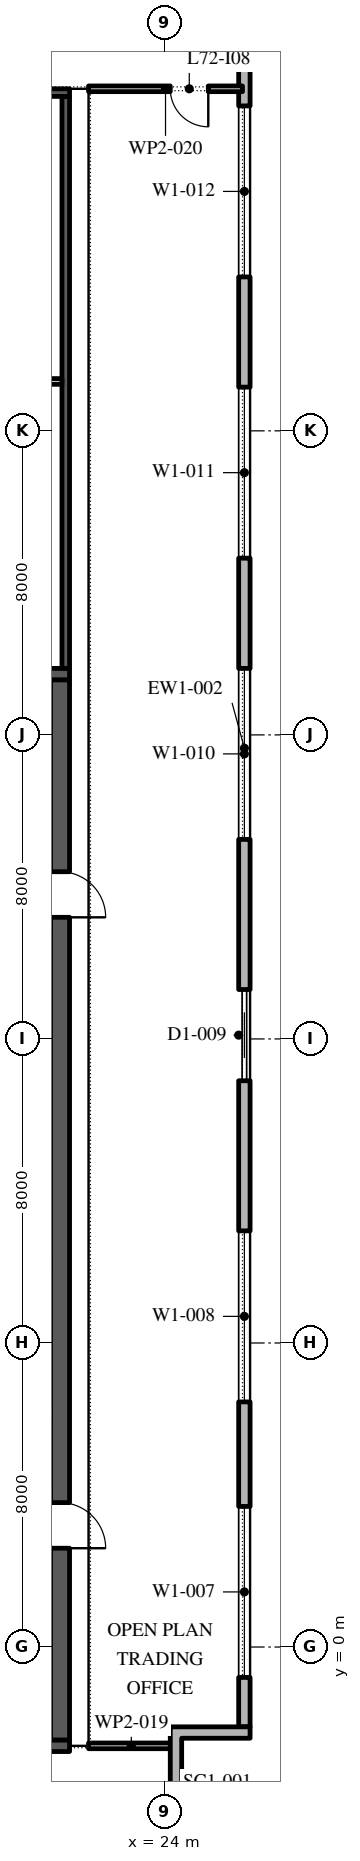
"""IFC4 building model, lengths in metres.
Left out: names, types, materials, properties, quantities, classifications, styles, units other than length and angle.
Written with IfcOpenShell. Run it as: python <this file> out.ifc"""

import sys

from ifc_helpers import new_model, si_unit, direction, frame, frame_2d, origin, place, context, subcontext, project, spatial, polyline, rectangle, outline, extrude, element, fill, save


model = new_model("IFC4")
c1 = context("Model", 3, precision=1e-05, world=origin(), true_north=direction((0.0, 1.0)))
c2 = subcontext(c1, "Body", "Model", "MODEL_VIEW")
j1 = project(units=[si_unit("LENGTHUNIT", "METRE"), si_unit("PLANEANGLEUNIT", "RADIAN")], contexts=[c1])
p1 = place(None, origin())
s1 = spatial("IfcSite", under=j1, at=p1, CompositionType="ELEMENT")
p2 = place(p1, origin())
s2 = spatial("IfcBuilding", under=s1, at=p2, CompositionType="ELEMENT")
p3 = place(p2, frame((0.0, 0.0, 330.0)))
s3 = spatial("IfcBuildingStorey", under=s2, at=p3, CompositionType="ELEMENT", Elevation=330.0)
p4 = place(p3, frame((26.1, -2.1, 0.0), z_axis=(0.0, 0.0, 1.0), x_axis=(0.0, 1.0, 0.0)))
e1 = element("IfcWall", 1, at=p4, inside=s3, PredefinedType="STANDARD", context=c2, shape_type="SweptSolid", body=[
    extrude(rectangle(XDim=51.5, YDim=0.3, at=frame_2d((25.75, 0.0))), origin(), (0.0, 0.0, 1.0), 4.0),
])
p5 = place(p4, frame((1.3, 0.0, 0.45)))
e2 = element("IfcOpeningElement", 2, at=p5, cuts=e1, PredefinedType="OPENING", context=c2, shape_type="SweptSolid", body=[
    extrude(rectangle(XDim=4.5, YDim=3.05, at=frame_2d((2.25, 1.525))), frame((0.0, 0.16, 0.0), z_axis=(0.0, -1.0, 0.0), x_axis=(1.0, 0.0, 0.0)), (0.0, 0.0, 1.0), 0.32),
])
p6 = place(p4, frame((8.55, 0.0, 0.45)))
e3 = element("IfcOpeningElement", 3, at=p6, cuts=e1, PredefinedType="OPENING", context=c2, shape_type="SweptSolid", body=[
    extrude(rectangle(XDim=4.5, YDim=3.05, at=frame_2d((2.25, 1.525))), frame((0.0, 0.16, 0.0), z_axis=(0.0, -1.0, 0.0), x_axis=(1.0, 0.0, 0.0)), (0.0, 0.0, 1.0), 0.32),
])
p7 = place(p4, frame((17.0, 0.0, 0.0)))
e4 = element("IfcOpeningElement", 4, at=p7, cuts=e1, PredefinedType="OPENING", context=c2, shape_type="SweptSolid", body=[
    extrude(rectangle(XDim=2.4, YDim=3.5, at=frame_2d((1.2, 1.75))), frame((0.0, 0.16, 0.0), z_axis=(0.0, -1.0, 0.0), x_axis=(1.0, 0.0, 0.0)), (0.0, 0.0, 1.0), 0.32),
])
p8 = place(p4, frame((23.35, 0.0, 0.45)))
e5 = element("IfcOpeningElement", 5, at=p8, cuts=e1, PredefinedType="OPENING", context=c2, shape_type="SweptSolid", body=[
    extrude(rectangle(XDim=4.5, YDim=3.05, at=frame_2d((2.25, 1.525))), frame((0.0, 0.16, 0.0), z_axis=(0.0, -1.0, 0.0), x_axis=(1.0, 0.0, 0.0)), (0.0, 0.0, 1.0), 0.32),
])
p9 = place(p4, frame((30.75, 0.0, 0.45)))
e6 = element("IfcOpeningElement", 6, at=p9, cuts=e1, PredefinedType="OPENING", context=c2, shape_type="SweptSolid", body=[
    extrude(rectangle(XDim=4.5, YDim=3.05, at=frame_2d((2.25, 1.525))), frame((0.0, 0.16, 0.0), z_axis=(0.0, -1.0, 0.0), x_axis=(1.0, 0.0, 0.0)), (0.0, 0.0, 1.0), 0.32),
])
p10 = place(p4, frame((38.15, 0.0, 0.45)))
e7 = element("IfcOpeningElement", 7, at=p10, cuts=e1, PredefinedType="OPENING", context=c2, shape_type="SweptSolid", body=[
    extrude(rectangle(XDim=4.5, YDim=3.05, at=frame_2d((2.25, 1.525))), frame((0.0, 0.16, 0.0), z_axis=(0.0, -1.0, 0.0), x_axis=(1.0, 0.0, 0.0)), (0.0, 0.0, 1.0), 0.32),
])
p11 = place(p4, frame((46.6, 0.0, 0.0)))
e8 = element("IfcOpeningElement", 8, at=p11, cuts=e1, PredefinedType="OPENING", context=c2, shape_type="SweptSolid", body=[
    extrude(rectangle(XDim=2.4, YDim=3.5, at=frame_2d((1.2, 1.75))), frame((0.0, 0.16, 0.0), z_axis=(0.0, -1.0, 0.0), x_axis=(1.0, 0.0, 0.0)), (0.0, 0.0, 1.0), 0.32),
])
p12 = place(p3, origin())
e9 = element("IfcWall", 9, at=p12, inside=s3, PredefinedType="STANDARD", context=c2, shape_type="SweptSolid", body=[
    extrude(outline(polyline([(24.15, -3.9), (24.15, -2.1), (26.25, -2.1), (26.25, -2.4), (24.45, -2.4), (24.45, -4.2), (22.65, -4.2), (22.65, -5.7), (22.35, -5.7), (22.35, -3.9), (24.15, -3.9)])), origin(), (0.0, 0.0, 1.0), 4.0),
])
p13 = place(p3, frame((21.25, -2.45, 0.0), z_axis=(0.0, 0.0, 1.0), x_axis=(0.0, 1.0, 0.0)))
e10 = element("IfcWall", 10, at=p13, inside=s3, PredefinedType="SHEAR", context=c2, shape_type="SweptSolid", body=[
    extrude(rectangle(XDim=27.9, YDim=0.5, at=frame_2d((13.95, 0.0))), origin(), (0.0, 0.0, 1.0), 4.0),
])
p14 = place(p13, frame((5.05, 0.0, 0.0)))
e11 = element("IfcOpeningElement", 11, at=p14, cuts=e10, PredefinedType="OPENING", context=c2, shape_type="SweptSolid", body=[
    extrude(rectangle(XDim=1.2, YDim=2.1, at=frame_2d((0.6, 1.05))), frame((0.0, 0.26, 0.0), z_axis=(0.0, -1.0, 0.0), x_axis=(1.0, 0.0, 0.0)), (0.0, 0.0, 1.0), 0.52),
])
p15 = place(p13, frame((21.65, 0.0, 0.0)))
e12 = element("IfcOpeningElement", 12, at=p15, cuts=e10, PredefinedType="OPENING", context=c2, shape_type="SweptSolid", body=[
    extrude(rectangle(XDim=1.2, YDim=2.1, at=frame_2d((0.6, 1.05))), frame((0.0, 0.26, 0.0), z_axis=(0.0, -1.0, 0.0), x_axis=(1.0, 0.0, 0.0)), (0.0, 0.0, 1.0), 0.52),
])
for number, where, z_axis, x_axis in (
    (13, (10.5, -2.6, 0.0), (0.0, 0.0, 1.0), (1.0, 0.0, 0.0)),
    (14, (10.5, 25.6, 0.0), (0.0, 0.0, 1.0), (1.0, 0.0, 0.0)),
):
    element("IfcWall", number, at=place(p3, frame(where, z_axis=z_axis, x_axis=x_axis)), inside=s3, PredefinedType="SHEAR", context=c2, shape_type="SweptSolid", body=[
        extrude(rectangle(XDim=11.0, YDim=0.3, at=frame_2d((5.5, 0.0))), origin(), (0.0, 0.0, 1.0), 4.0),
    ])
p16 = place(p3, frame((21.4, 25.75, 0.0), z_axis=(0.0, 0.0, 1.0), x_axis=(0.0, 1.0, 0.0)))
e15 = element("IfcWall", 15, at=p16, inside=s3, PredefinedType="SHEAR", context=c2, shape_type="SweptSolid", body=[
    extrude(rectangle(XDim=15.05, YDim=0.2, at=frame_2d((7.525, 0.0))), origin(), (0.0, 0.0, 1.0), 4.0),
])
p17 = place(p3, frame((10.5, 40.9, 0.0), z_axis=(0.0, 0.0, 1.0), x_axis=(1.0, 0.0, 0.0)))
e16 = element("IfcWall", 16, at=p17, inside=s3, PredefinedType="SHEAR", context=c2, shape_type="SweptSolid", body=[
    extrude(rectangle(XDim=11.0, YDim=0.2, at=frame_2d((5.5, 0.0))), origin(), (0.0, 0.0, 1.0), 4.0),
])
p18 = place(p3, frame((10.7, 33.3, 0.0), z_axis=(0.0, 0.0, 1.0), x_axis=(1.0, 0.0, 0.0)))
e17 = element("IfcWall", 17, at=p18, inside=s3, PredefinedType="PARTITIONING", context=c2, shape_type="SweptSolid", body=[
    extrude(rectangle(XDim=10.6, YDim=0.15, at=frame_2d((5.3, 0.0))), origin(), (0.0, 0.0, 1.0), 4.0),
])
p19 = place(p3, frame((22.0, -2.6, 0.0), z_axis=(0.0, 0.0, 1.0), x_axis=(1.0, 0.0, 0.0)))
e18 = element("IfcWall", 18, at=p19, inside=s3, PredefinedType="PARTITIONING", context=c2, shape_type="SweptSolid", body=[
    extrude(rectangle(XDim=2.25, YDim=0.15, at=frame_2d((1.125, 0.0))), origin(), (0.0, 0.0, 1.0), 4.0),
])
p20 = place(p3, frame((26.05, 41.0, 0.0), z_axis=(0.0, 0.0, 1.0), x_axis=(-1.0, 0.0, 0.0)))
e19 = element("IfcWall", 19, at=p20, inside=s3, PredefinedType="PARTITIONING", context=c2, shape_type="SweptSolid", body=[
    extrude(rectangle(XDim=4.05, YDim=0.15, at=frame_2d((2.025, 0.0))), origin(), (0.0, 0.0, 1.0), 4.0),
])
p21 = place(p20, frame((0.9, 0.0, 0.0)))
e20 = element("IfcOpeningElement", 20, at=p21, cuts=e19, PredefinedType="OPENING", context=c2, shape_type="SweptSolid", body=[
    extrude(rectangle(XDim=1.0, YDim=2.1, at=frame_2d((0.5, 1.05))), frame((0.0, 0.085, 0.0), z_axis=(0.0, -1.0, 0.0), x_axis=(1.0, 0.0, 0.0)), (0.0, 0.0, 1.0), 0.17),
])
p22 = place(p5, origin())
e21 = element("IfcWindow", 21, at=p22, inside=s3, PartitioningType="DOUBLE_PANEL_VERTICAL", PredefinedType="WINDOW", context=c2, shape_type="SweptSolid", body=[
    extrude(rectangle(XDim=4.5, YDim=3.05, at=frame_2d((2.25, 1.525))), frame((0.0, 0.03, 0.0), z_axis=(0.0, -1.0, 0.0), x_axis=(1.0, 0.0, 0.0)), (0.0, 0.0, 1.0), 0.06),
])
fill(e2, e21)
p23 = place(p6, origin())
e22 = element("IfcWindow", 22, at=p23, inside=s3, PartitioningType="DOUBLE_PANEL_VERTICAL", PredefinedType="WINDOW", context=c2, shape_type="SweptSolid", body=[
    extrude(rectangle(XDim=4.5, YDim=3.05, at=frame_2d((2.25, 1.525))), frame((0.0, 0.03, 0.0), z_axis=(0.0, -1.0, 0.0), x_axis=(1.0, 0.0, 0.0)), (0.0, 0.0, 1.0), 0.06),
])
fill(e3, e22)
p24 = place(p7, origin())
e23 = element("IfcDoor", 23, at=p24, inside=s3, OperationType="DOUBLE_DOOR_SLIDING", PredefinedType="DOOR", context=c2, shape_type="SweptSolid", body=[
    extrude(rectangle(XDim=2.4, YDim=3.5, at=frame_2d((1.2, 1.75))), frame((0.0, 0.025, 0.0), z_axis=(0.0, -1.0, 0.0), x_axis=(1.0, 0.0, 0.0)), (0.0, 0.0, 1.0), 0.05),
])
fill(e4, e23)
p25 = place(p8, origin())
e24 = element("IfcWindow", 24, at=p25, inside=s3, PartitioningType="DOUBLE_PANEL_VERTICAL", PredefinedType="WINDOW", context=c2, shape_type="SweptSolid", body=[
    extrude(rectangle(XDim=4.5, YDim=3.05, at=frame_2d((2.25, 1.525))), frame((0.0, 0.03, 0.0), z_axis=(0.0, -1.0, 0.0), x_axis=(1.0, 0.0, 0.0)), (0.0, 0.0, 1.0), 0.06),
])
fill(e5, e24)
p26 = place(p9, origin())
e25 = element("IfcWindow", 25, at=p26, inside=s3, PartitioningType="DOUBLE_PANEL_VERTICAL", PredefinedType="WINDOW", context=c2, shape_type="SweptSolid", body=[
    extrude(rectangle(XDim=4.5, YDim=3.05, at=frame_2d((2.25, 1.525))), frame((0.0, 0.03, 0.0), z_axis=(0.0, -1.0, 0.0), x_axis=(1.0, 0.0, 0.0)), (0.0, 0.0, 1.0), 0.06),
])
fill(e6, e25)
p27 = place(p10, origin())
e26 = element("IfcWindow", 26, at=p27, inside=s3, PartitioningType="DOUBLE_PANEL_VERTICAL", PredefinedType="WINDOW", context=c2, shape_type="SweptSolid", body=[
    extrude(rectangle(XDim=4.5, YDim=3.05, at=frame_2d((2.25, 1.525))), frame((0.0, 0.03, 0.0), z_axis=(0.0, -1.0, 0.0), x_axis=(1.0, 0.0, 0.0)), (0.0, 0.0, 1.0), 0.06),
])
fill(e7, e26)
p28 = place(p14, frame((1.2, 0.0, 0.0), z_axis=(0.0, 0.0, 1.0), x_axis=(-1.0, 0.0, 0.0)))
e27 = element("IfcDoor", 27, at=p28, inside=s3, OperationType="SINGLE_SWING_LEFT", PredefinedType="DOOR", context=c2, shape_type="SweptSolid", body=[
    extrude(rectangle(XDim=1.2, YDim=2.1, at=frame_2d((0.6, 1.05))), frame((0.0, 0.025, 0.0), z_axis=(0.0, -1.0, 0.0), x_axis=(1.0, 0.0, 0.0)), (0.0, 0.0, 1.0), 0.05),
])
fill(e11, e27)
p29 = place(p15, frame((1.2, 0.0, 0.0), z_axis=(0.0, 0.0, 1.0), x_axis=(-1.0, 0.0, 0.0)))
e28 = element("IfcDoor", 28, at=p29, inside=s3, OperationType="SINGLE_SWING_LEFT", PredefinedType="DOOR", context=c2, shape_type="SweptSolid", body=[
    extrude(rectangle(XDim=1.2, YDim=2.1, at=frame_2d((0.6, 1.05))), frame((0.0, 0.025, 0.0), z_axis=(0.0, -1.0, 0.0), x_axis=(1.0, 0.0, 0.0)), (0.0, 0.0, 1.0), 0.05),
])
fill(e12, e28)
p30 = place(p21, origin())
e29 = element("IfcDoor", 29, at=p30, inside=s3, OperationType="SINGLE_SWING_RIGHT", PredefinedType="DOOR", context=c2, shape_type="SweptSolid", body=[
    extrude(rectangle(XDim=1.0, YDim=2.1, at=frame_2d((0.5, 1.05))), frame((0.0, 0.025, 0.0), z_axis=(0.0, -1.0, 0.0), x_axis=(1.0, 0.0, 0.0)), (0.0, 0.0, 1.0), 0.05),
])
fill(e20, e29)
save(model, sys.argv[1])
